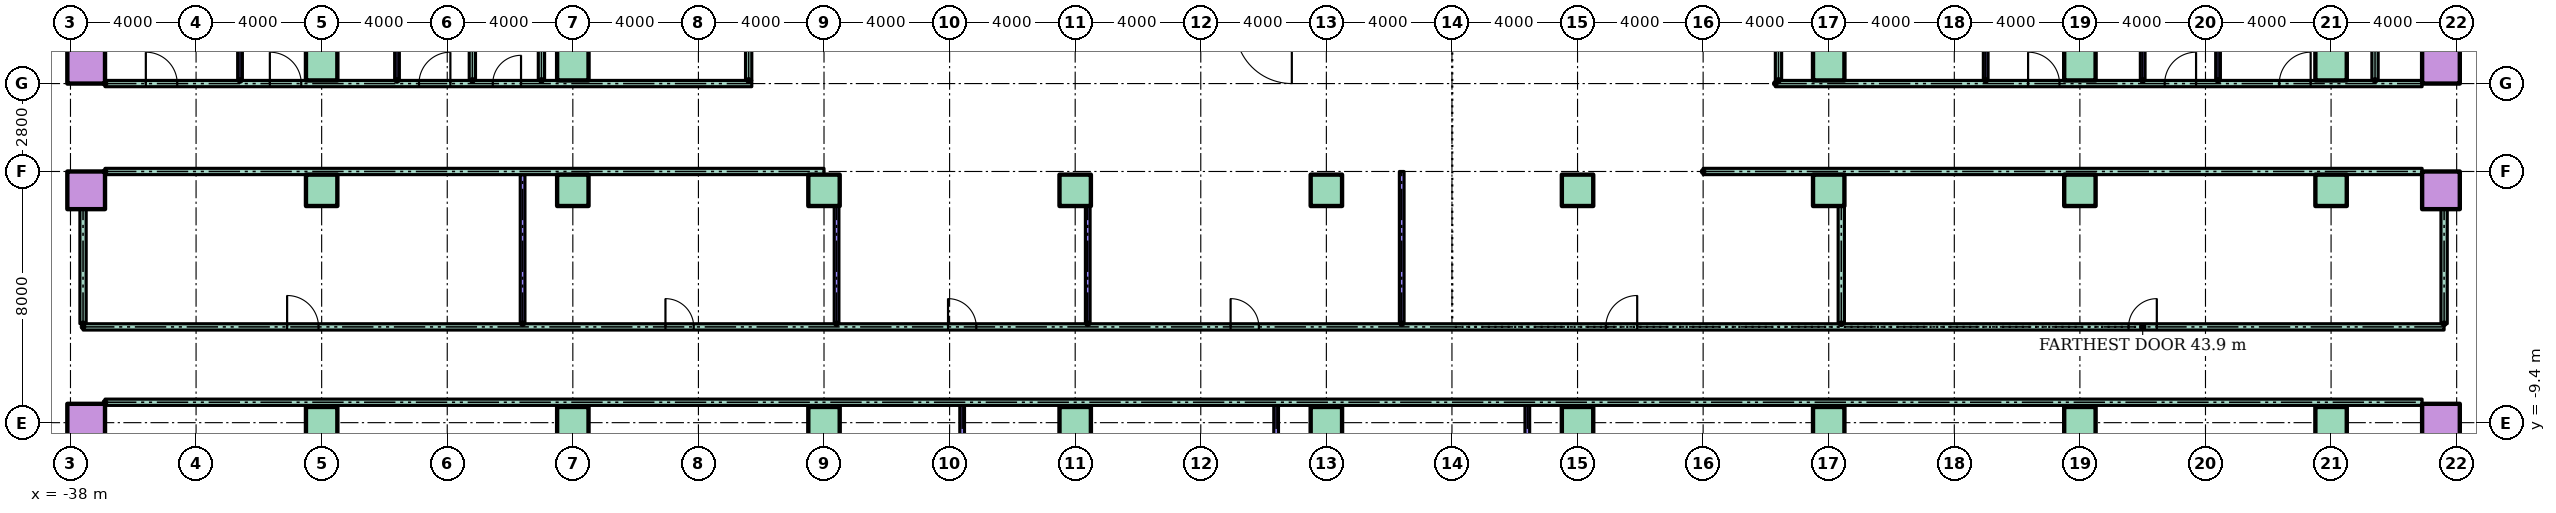
"""IFC4 building model, lengths in metres.
Left out: names, types, materials, properties, quantities, classifications, styles, units other than length and angle.
Written with IfcOpenShell. Run it as: python <this file> out.ifc"""

import sys

from ifc_helpers import new_model, si_unit, direction, frame, frame_2d, origin, origin_2d, place, context, subcontext, project, spatial, rectangle, hollow_rectangle, extrude, element, fill, save


model = new_model("IFC4")
c1 = context("Model", 3, precision=1e-05, world=origin(), true_north=direction((0.0, 1.0)))
c2 = subcontext(c1, "Body", "Model", "MODEL_VIEW")
j1 = project(units=[si_unit("LENGTHUNIT", "METRE"), si_unit("PLANEANGLEUNIT", "RADIAN")], contexts=[c1])
p1 = place(None, origin())
s1 = spatial("IfcSite", under=j1, at=p1, CompositionType="ELEMENT")
p2 = place(p1, origin())
s2 = spatial("IfcBuilding", under=s1, at=p2, CompositionType="ELEMENT")
p3 = place(p2, frame((0.0, 0.0, 10.0)))
s3 = spatial("IfcBuildingStorey", under=s2, at=p3, CompositionType="ELEMENT", Elevation=10.0)
p4 = place(p3, frame((-37.5, -9.4, 0.0)))
e1 = element("IfcColumn", 1, at=p4, inside=s3, PredefinedType="COLUMN", context=c2, shape_type="SweptSolid", body=[
    extrude(hollow_rectangle(XDim=1.2, YDim=1.2, WallThickness=0.06, at=origin_2d()), origin(), (0.0, 0.0, 1.0), 4.0),
])
for number, where in (
    (2, (-30.0, -9.4, 0.0)),
    (3, (-22.0, -9.4, 0.0)),
    (4, (-14.0, -9.4, 0.0)),
    (5, (-6.0, -9.4, 0.0)),
    (6, (2.0, -9.4, 0.0)),
    (7, (10.0, -9.4, 0.0)),
    (8, (18.0, -9.4, 0.0)),
    (9, (26.0, -9.4, 0.0)),
    (10, (34.0, -9.4, 0.0)),
):
    element("IfcColumn", number, at=place(p3, frame(where)), inside=s3, PredefinedType="COLUMN", context=c2, shape_type="SweptSolid", body=[
        extrude(rectangle(XDim=1.0, YDim=1.0, at=origin_2d()), origin(), (0.0, 0.0, 1.0), 4.0),
    ])
for number, where in (
    (11, (37.5, -9.4, 0.0)),
    (12, (-37.5, -2.0, 0.0)),
):
    element("IfcColumn", number, at=place(p3, frame(where)), inside=s3, PredefinedType="COLUMN", context=c2, shape_type="SweptSolid", body=[
        extrude(hollow_rectangle(XDim=1.2, YDim=1.2, WallThickness=0.06, at=origin_2d()), origin(), (0.0, 0.0, 1.0), 4.0),
    ])
for number, where in (
    (13, (-30.0, -2.0, 0.0)),
    (14, (-22.0, -2.0, 0.0)),
    (15, (-14.0, -2.0, 0.0)),
    (16, (-6.0, -2.0, 0.0)),
    (17, (2.0, -2.0, 0.0)),
    (18, (10.0, -2.0, 0.0)),
    (19, (18.0, -2.0, 0.0)),
    (20, (26.0, -2.0, 0.0)),
    (21, (34.0, -2.0, 0.0)),
):
    element("IfcColumn", number, at=place(p3, frame(where)), inside=s3, PredefinedType="COLUMN", context=c2, shape_type="SweptSolid", body=[
        extrude(rectangle(XDim=1.0, YDim=1.0, at=origin_2d()), origin(), (0.0, 0.0, 1.0), 4.0),
    ])
for number, where in (
    (22, (37.5, -2.0, 0.0)),
    (23, (-37.5, 2.0, 0.0)),
):
    element("IfcColumn", number, at=place(p3, frame(where)), inside=s3, PredefinedType="COLUMN", context=c2, shape_type="SweptSolid", body=[
        extrude(hollow_rectangle(XDim=1.2, YDim=1.2, WallThickness=0.06, at=origin_2d()), origin(), (0.0, 0.0, 1.0), 4.0),
    ])
for number, where in (
    (24, (-30.0, 2.0, 0.0)),
    (25, (-22.0, 2.0, 0.0)),
    (26, (18.0, 2.0, 0.0)),
    (27, (26.0, 2.0, 0.0)),
    (28, (34.0, 2.0, 0.0)),
):
    element("IfcColumn", number, at=place(p3, frame(where)), inside=s3, PredefinedType="COLUMN", context=c2, shape_type="SweptSolid", body=[
        extrude(rectangle(XDim=1.0, YDim=1.0, at=origin_2d()), origin(), (0.0, 0.0, 1.0), 4.0),
    ])
p5 = place(p3, frame((37.5, 2.0, 0.0)))
e29 = element("IfcColumn", 29, at=p5, inside=s3, PredefinedType="COLUMN", context=c2, shape_type="SweptSolid", body=[
    extrude(hollow_rectangle(XDim=1.2, YDim=1.2, WallThickness=0.06, at=origin_2d()), origin(), (0.0, 0.0, 1.0), 4.0),
])
p6 = place(p3, frame((-36.9, -8.75, 0.0)))
e30 = element("IfcWall", 30, at=p6, inside=s3, PredefinedType="PARTITIONING", context=c2, shape_type="SweptSolid", body=[
    extrude(rectangle(XDim=73.8, YDim=0.2, at=frame_2d((36.9, 0.0))), origin(), (0.0, 0.0, 1.0), 3.7),
])
p7 = place(p3, frame((-37.6, -6.35, 0.0)))
e31 = element("IfcWall", 31, at=p7, inside=s3, PredefinedType="PARTITIONING", context=c2, shape_type="SweptSolid", body=[
    extrude(rectangle(XDim=75.2, YDim=0.2, at=frame_2d((37.6, 0.0))), origin(), (0.0, 0.0, 1.0), 3.7),
])
p8 = place(p7, frame((6.5, 0.0, 0.0)))
e32 = element("IfcOpeningElement", 32, at=p8, cuts=e31, PredefinedType="OPENING", context=c2, shape_type="SweptSolid", body=[
    extrude(rectangle(XDim=1.0, YDim=2.1, at=frame_2d((0.5, 1.05))), frame((0.0, 0.11, 0.0), z_axis=(0.0, -1.0, 0.0), x_axis=(1.0, 0.0, 0.0)), (0.0, 0.0, 1.0), 0.22),
])
p9 = place(p7, frame((18.55, 0.0, 0.0)))
e33 = element("IfcOpeningElement", 33, at=p9, cuts=e31, PredefinedType="OPENING", context=c2, shape_type="SweptSolid", body=[
    extrude(rectangle(XDim=0.9, YDim=2.1, at=frame_2d((0.45, 1.05))), frame((0.0, 0.11, 0.0), z_axis=(0.0, -1.0, 0.0), x_axis=(1.0, 0.0, 0.0)), (0.0, 0.0, 1.0), 0.22),
])
p10 = place(p7, frame((27.55, 0.0, 0.0)))
e34 = element("IfcOpeningElement", 34, at=p10, cuts=e31, PredefinedType="OPENING", context=c2, shape_type="SweptSolid", body=[
    extrude(rectangle(XDim=0.9, YDim=2.1, at=frame_2d((0.45, 1.05))), frame((0.0, 0.11, 0.0), z_axis=(0.0, -1.0, 0.0), x_axis=(1.0, 0.0, 0.0)), (0.0, 0.0, 1.0), 0.22),
])
p11 = place(p7, frame((36.55, 0.0, 0.0)))
e35 = element("IfcOpeningElement", 35, at=p11, cuts=e31, PredefinedType="OPENING", context=c2, shape_type="SweptSolid", body=[
    extrude(rectangle(XDim=0.9, YDim=2.1, at=frame_2d((0.45, 1.05))), frame((0.0, 0.11, 0.0), z_axis=(0.0, -1.0, 0.0), x_axis=(1.0, 0.0, 0.0)), (0.0, 0.0, 1.0), 0.22),
])
p12 = place(p7, frame((48.5, 0.0, 0.0)))
e36 = element("IfcOpeningElement", 36, at=p12, cuts=e31, PredefinedType="OPENING", context=c2, shape_type="SweptSolid", body=[
    extrude(rectangle(XDim=1.0, YDim=2.1, at=frame_2d((0.5, 1.05))), frame((0.0, 0.11, 0.0), z_axis=(0.0, -1.0, 0.0), x_axis=(1.0, 0.0, 0.0)), (0.0, 0.0, 1.0), 0.22),
])
p13 = place(p7, frame((65.15, 0.0, 0.0)))
e37 = element("IfcOpeningElement", 37, at=p13, cuts=e31, PredefinedType="OPENING", context=c2, shape_type="SweptSolid", body=[
    extrude(rectangle(XDim=0.9, YDim=2.1, at=frame_2d((0.45, 1.05))), frame((0.0, 0.11, 0.0), z_axis=(0.0, -1.0, 0.0), x_axis=(1.0, 0.0, 0.0)), (0.0, 0.0, 1.0), 0.22),
])
for number, where in (
    (38, (-36.9, -1.4, 0.0)),
    (39, (14.0, -1.4, 0.0)),
):
    element("IfcWall", number, at=place(p3, frame(where)), inside=s3, PredefinedType="PARTITIONING", context=c2, shape_type="SweptSolid", body=[
        extrude(rectangle(XDim=22.9, YDim=0.2, at=frame_2d((11.45, 0.0))), origin(), (0.0, 0.0, 1.0), 3.7),
    ])
p14 = place(p3, frame((-36.9, 1.4, 0.0)))
e40 = element("IfcWall", 40, at=p14, inside=s3, PredefinedType="PARTITIONING", context=c2, shape_type="SweptSolid", body=[
    extrude(rectangle(XDim=20.6, YDim=0.2, at=frame_2d((10.3, 0.0))), origin(), (0.0, 0.0, 1.0), 3.7),
])
p15 = place(p14, frame((1.3, 0.0, 0.0)))
e41 = element("IfcOpeningElement", 41, at=p15, cuts=e40, PredefinedType="OPENING", context=c2, shape_type="SweptSolid", body=[
    extrude(rectangle(XDim=1.0, YDim=2.1, at=frame_2d((0.5, 1.05))), frame((0.0, 0.11, 0.0), z_axis=(0.0, -1.0, 0.0), x_axis=(1.0, 0.0, 0.0)), (0.0, 0.0, 1.0), 0.22),
])
p16 = place(p14, frame((5.25, 0.0, 0.0)))
e42 = element("IfcOpeningElement", 42, at=p16, cuts=e40, PredefinedType="OPENING", context=c2, shape_type="SweptSolid", body=[
    extrude(rectangle(XDim=1.0, YDim=2.1, at=frame_2d((0.5, 1.05))), frame((0.0, 0.11, 0.0), z_axis=(0.0, -1.0, 0.0), x_axis=(1.0, 0.0, 0.0)), (0.0, 0.0, 1.0), 0.22),
])
p17 = place(p14, frame((10.0, 0.0, 0.0)))
e43 = element("IfcOpeningElement", 43, at=p17, cuts=e40, PredefinedType="OPENING", context=c2, shape_type="SweptSolid", body=[
    extrude(rectangle(XDim=1.0, YDim=2.1, at=frame_2d((0.5, 1.05))), frame((0.0, 0.11, 0.0), z_axis=(0.0, -1.0, 0.0), x_axis=(1.0, 0.0, 0.0)), (0.0, 0.0, 1.0), 0.22),
])
p18 = place(p14, frame((12.35, 0.0, 0.0)))
e44 = element("IfcOpeningElement", 44, at=p18, cuts=e40, PredefinedType="OPENING", context=c2, shape_type="SweptSolid", body=[
    extrude(rectangle(XDim=0.9, YDim=2.1, at=frame_2d((0.45, 1.05))), frame((0.0, 0.11, 0.0), z_axis=(0.0, -1.0, 0.0), x_axis=(1.0, 0.0, 0.0)), (0.0, 0.0, 1.0), 0.22),
])
p19 = place(p3, frame((16.3, 1.4, 0.0)))
e45 = element("IfcWall", 45, at=p19, inside=s3, PredefinedType="PARTITIONING", context=c2, shape_type="SweptSolid", body=[
    extrude(rectangle(XDim=20.6, YDim=0.2, at=frame_2d((10.3, 0.0))), origin(), (0.0, 0.0, 1.0), 3.7),
])
p20 = place(p19, frame((8.05, 0.0, 0.0)))
e46 = element("IfcOpeningElement", 46, at=p20, cuts=e45, PredefinedType="OPENING", context=c2, shape_type="SweptSolid", body=[
    extrude(rectangle(XDim=1.0, YDim=2.1, at=frame_2d((0.5, 1.05))), frame((0.0, 0.11, 0.0), z_axis=(0.0, -1.0, 0.0), x_axis=(1.0, 0.0, 0.0)), (0.0, 0.0, 1.0), 0.22),
])
p21 = place(p19, frame((12.4, 0.0, 0.0)))
e47 = element("IfcOpeningElement", 47, at=p21, cuts=e45, PredefinedType="OPENING", context=c2, shape_type="SweptSolid", body=[
    extrude(rectangle(XDim=1.0, YDim=2.1, at=frame_2d((0.5, 1.05))), frame((0.0, 0.11, 0.0), z_axis=(0.0, -1.0, 0.0), x_axis=(1.0, 0.0, 0.0)), (0.0, 0.0, 1.0), 0.22),
])
p22 = place(p19, frame((16.05, 0.0, 0.0)))
e48 = element("IfcOpeningElement", 48, at=p22, cuts=e45, PredefinedType="OPENING", context=c2, shape_type="SweptSolid", body=[
    extrude(rectangle(XDim=1.0, YDim=2.1, at=frame_2d((0.5, 1.05))), frame((0.0, 0.11, 0.0), z_axis=(0.0, -1.0, 0.0), x_axis=(1.0, 0.0, 0.0)), (0.0, 0.0, 1.0), 0.22),
])
p23 = place(p3, frame((-37.6, -6.25, 0.0), z_axis=(0.0, 0.0, 1.0), x_axis=(0.0, 1.0, 0.0)))
e49 = element("IfcWall", 49, at=p23, inside=s3, PredefinedType="PARTITIONING", context=c2, shape_type="SweptSolid", body=[
    extrude(rectangle(XDim=3.65, YDim=0.2, at=frame_2d((1.825, 0.0))), origin(), (0.0, 0.0, 1.0), 3.7),
])
for number, where, z_axis, x_axis in (
    (50, (-32.6, 1.5, 0.0), (0.0, 0.0, 1.0), (0.0, 1.0, 0.0)),
    (51, (-27.6, 1.5, 0.0), (0.0, 0.0, 1.0), (0.0, 1.0, 0.0)),
):
    element("IfcWall", number, at=place(p3, frame(where, z_axis=z_axis, x_axis=x_axis)), inside=s3, PredefinedType="PARTITIONING", context=c2, shape_type="SweptSolid", body=[
        extrude(rectangle(XDim=7.0, YDim=0.15, at=frame_2d((3.5, 0.0))), origin(), (0.0, 0.0, 1.0), 3.7),
    ])
p24 = place(p3, frame((-25.2, 1.5, 0.0), z_axis=(0.0, 0.0, 1.0), x_axis=(0.0, 1.0, 0.0)))
e52 = element("IfcWall", 52, at=p24, inside=s3, PredefinedType="PARTITIONING", context=c2, shape_type="SweptSolid", body=[
    extrude(rectangle(XDim=7.0, YDim=0.2, at=frame_2d((3.5, 0.0))), origin(), (0.0, 0.0, 1.0), 3.7),
])
p25 = place(p3, frame((-23.6, -6.25, 0.0), z_axis=(0.0, 0.0, 1.0), x_axis=(0.0, 1.0, 0.0)))
e53 = element("IfcWall", 53, at=p25, inside=s3, PredefinedType="PARTITIONING", context=c2, shape_type="SweptSolid", body=[
    extrude(rectangle(XDim=4.75, YDim=0.15, at=frame_2d((2.375, 0.0))), origin(), (0.0, 0.0, 1.0), 3.7),
])
p26 = place(p3, frame((-23.0, 1.5, 0.0), z_axis=(0.0, 0.0, 1.0), x_axis=(0.0, 1.0, 0.0)))
e54 = element("IfcWall", 54, at=p26, inside=s3, PredefinedType="PARTITIONING", context=c2, shape_type="SweptSolid", body=[
    extrude(rectangle(XDim=7.0, YDim=0.2, at=frame_2d((3.5, 0.0))), origin(), (0.0, 0.0, 1.0), 3.7),
])
p27 = place(p3, frame((-16.4, 1.5, 0.0), z_axis=(0.0, 0.0, 1.0), x_axis=(0.0, 1.0, 0.0)))
e55 = element("IfcWall", 55, at=p27, inside=s3, PredefinedType="PARTITIONING", context=c2, shape_type="SweptSolid", body=[
    extrude(rectangle(XDim=7.0, YDim=0.2, at=frame_2d((3.5, 0.0))), origin(), (0.0, 0.0, 1.0), 3.7),
])
p28 = place(p27, frame((3.05, 0.0, 0.0)))
e56 = element("IfcOpeningElement", 56, at=p28, cuts=e55, PredefinedType="OPENING", context=c2, shape_type="SweptSolid", body=[
    extrude(rectangle(XDim=0.9, YDim=2.1, at=frame_2d((0.45, 1.05))), frame((0.0, 0.11, 0.0), z_axis=(0.0, -1.0, 0.0), x_axis=(1.0, 0.0, 0.0)), (0.0, 0.0, 1.0), 0.22),
])
p29 = place(p3, frame((-13.6, -6.25, 0.0), z_axis=(0.0, 0.0, 1.0), x_axis=(0.0, 1.0, 0.0)))
e57 = element("IfcWall", 57, at=p29, inside=s3, PredefinedType="PARTITIONING", context=c2, shape_type="SweptSolid", body=[
    extrude(rectangle(XDim=3.75, YDim=0.15, at=frame_2d((1.875, 0.0))), origin(), (0.0, 0.0, 1.0), 3.7),
])
p30 = place(p3, frame((-9.6, -19.5, 0.0), z_axis=(0.0, 0.0, 1.0), x_axis=(0.0, 1.0, 0.0)))
e58 = element("IfcWall", 58, at=p30, inside=s3, PredefinedType="PARTITIONING", context=c2, shape_type="SweptSolid", body=[
    extrude(rectangle(XDim=10.65, YDim=0.15, at=frame_2d((5.325, 0.0))), origin(), (0.0, 0.0, 1.0), 3.7),
])
p31 = place(p3, frame((-5.6, -6.25, 0.0), z_axis=(0.0, 0.0, 1.0), x_axis=(0.0, 1.0, 0.0)))
e59 = element("IfcWall", 59, at=p31, inside=s3, PredefinedType="PARTITIONING", context=c2, shape_type="SweptSolid", body=[
    extrude(rectangle(XDim=3.75, YDim=0.15, at=frame_2d((1.875, 0.0))), origin(), (0.0, 0.0, 1.0), 3.7),
])
p32 = place(p3, frame((0.4, -19.5, 0.0), z_axis=(0.0, 0.0, 1.0), x_axis=(0.0, 1.0, 0.0)))
e60 = element("IfcWall", 60, at=p32, inside=s3, PredefinedType="PARTITIONING", context=c2, shape_type="SweptSolid", body=[
    extrude(rectangle(XDim=10.65, YDim=0.15, at=frame_2d((5.325, 0.0))), origin(), (0.0, 0.0, 1.0), 3.7),
])
p33 = place(p3, frame((4.4, -6.25, 0.0), z_axis=(0.0, 0.0, 1.0), x_axis=(0.0, 1.0, 0.0)))
e61 = element("IfcWall", 61, at=p33, inside=s3, PredefinedType="PARTITIONING", context=c2, shape_type="SweptSolid", body=[
    extrude(rectangle(XDim=4.85, YDim=0.15, at=frame_2d((2.425, 0.0))), origin(), (0.0, 0.0, 1.0), 3.7),
])
p34 = place(p3, frame((8.4, -19.5, 0.0), z_axis=(0.0, 0.0, 1.0), x_axis=(0.0, 1.0, 0.0)))
e62 = element("IfcWall", 62, at=p34, inside=s3, PredefinedType="PARTITIONING", context=c2, shape_type="SweptSolid", body=[
    extrude(rectangle(XDim=10.65, YDim=0.15, at=frame_2d((5.325, 0.0))), origin(), (0.0, 0.0, 1.0), 3.7),
])
p35 = place(p3, frame((16.4, 1.5, 0.0), z_axis=(0.0, 0.0, 1.0), x_axis=(0.0, 1.0, 0.0)))
e63 = element("IfcWall", 63, at=p35, inside=s3, PredefinedType="PARTITIONING", context=c2, shape_type="SweptSolid", body=[
    extrude(rectangle(XDim=7.0, YDim=0.2, at=frame_2d((3.5, 0.0))), origin(), (0.0, 0.0, 1.0), 3.7),
])
p36 = place(p35, frame((3.0, 0.0, 0.0)))
e64 = element("IfcOpeningElement", 64, at=p36, cuts=e63, PredefinedType="OPENING", context=c2, shape_type="SweptSolid", body=[
    extrude(rectangle(XDim=1.0, YDim=2.1, at=frame_2d((0.5, 1.05))), frame((0.0, 0.11, 0.0), z_axis=(0.0, -1.0, 0.0), x_axis=(1.0, 0.0, 0.0)), (0.0, 0.0, 1.0), 0.22),
])
p37 = place(p3, frame((18.4, -6.25, 0.0), z_axis=(0.0, 0.0, 1.0), x_axis=(0.0, 1.0, 0.0)))
e65 = element("IfcWall", 65, at=p37, inside=s3, PredefinedType="PARTITIONING", context=c2, shape_type="SweptSolid", body=[
    extrude(rectangle(XDim=3.75, YDim=0.2, at=frame_2d((1.875, 0.0))), origin(), (0.0, 0.0, 1.0), 3.7),
])
for number, where, z_axis, x_axis in (
    (66, (23.0, 1.5, 0.0), (0.0, 0.0, 1.0), (0.0, 1.0, 0.0)),
    (67, (28.0, 1.5, 0.0), (0.0, 0.0, 1.0), (0.0, 1.0, 0.0)),
    (68, (30.4, 1.5, 0.0), (0.0, 0.0, 1.0), (0.0, 1.0, 0.0)),
):
    element("IfcWall", number, at=place(p3, frame(where, z_axis=z_axis, x_axis=x_axis)), inside=s3, PredefinedType="PARTITIONING", context=c2, shape_type="SweptSolid", body=[
        extrude(rectangle(XDim=7.0, YDim=0.15, at=frame_2d((3.5, 0.0))), origin(), (0.0, 0.0, 1.0), 3.7),
    ])
p38 = place(p3, frame((35.4, 1.5, 0.0), z_axis=(0.0, 0.0, 1.0), x_axis=(0.0, 1.0, 0.0)))
e69 = element("IfcWall", 69, at=p38, inside=s3, PredefinedType="PARTITIONING", context=c2, shape_type="SweptSolid", body=[
    extrude(rectangle(XDim=7.0, YDim=0.2, at=frame_2d((3.5, 0.0))), origin(), (0.0, 0.0, 1.0), 3.7),
])
p39 = place(p3, frame((37.6, -6.25, 0.0), z_axis=(0.0, 0.0, 1.0), x_axis=(0.0, 1.0, 0.0)))
e70 = element("IfcWall", 70, at=p39, inside=s3, PredefinedType="PARTITIONING", context=c2, shape_type="SweptSolid", body=[
    extrude(rectangle(XDim=3.65, YDim=0.2, at=frame_2d((1.825, 0.0))), origin(), (0.0, 0.0, 1.0), 3.7),
])
p40 = place(p8, origin())
e71 = element("IfcDoor", 71, at=p40, inside=s3, OperationType="SINGLE_SWING_LEFT", PredefinedType="DOOR", context=c2, shape_type="SweptSolid", body=[
    extrude(rectangle(XDim=1.0, YDim=2.1, at=frame_2d((0.5, 1.05))), frame((0.0, 0.025, 0.0), z_axis=(0.0, -1.0, 0.0), x_axis=(1.0, 0.0, 0.0)), (0.0, 0.0, 1.0), 0.05),
])
fill(e32, e71)
p41 = place(p9, origin())
e72 = element("IfcDoor", 72, at=p41, inside=s3, OperationType="SINGLE_SWING_LEFT", PredefinedType="DOOR", context=c2, shape_type="SweptSolid", body=[
    extrude(rectangle(XDim=0.9, YDim=2.1, at=frame_2d((0.45, 1.05))), frame((0.0, 0.025, 0.0), z_axis=(0.0, -1.0, 0.0), x_axis=(1.0, 0.0, 0.0)), (0.0, 0.0, 1.0), 0.05),
])
fill(e33, e72)
p42 = place(p10, origin())
e73 = element("IfcDoor", 73, at=p42, inside=s3, OperationType="SINGLE_SWING_LEFT", PredefinedType="DOOR", context=c2, shape_type="SweptSolid", body=[
    extrude(rectangle(XDim=0.9, YDim=2.1, at=frame_2d((0.45, 1.05))), frame((0.0, 0.025, 0.0), z_axis=(0.0, -1.0, 0.0), x_axis=(1.0, 0.0, 0.0)), (0.0, 0.0, 1.0), 0.05),
])
fill(e34, e73)
p43 = place(p11, origin())
e74 = element("IfcDoor", 74, at=p43, inside=s3, OperationType="SINGLE_SWING_LEFT", PredefinedType="DOOR", context=c2, shape_type="SweptSolid", body=[
    extrude(rectangle(XDim=0.9, YDim=2.1, at=frame_2d((0.45, 1.05))), frame((0.0, 0.025, 0.0), z_axis=(0.0, -1.0, 0.0), x_axis=(1.0, 0.0, 0.0)), (0.0, 0.0, 1.0), 0.05),
])
fill(e35, e74)
p44 = place(p12, origin())
e75 = element("IfcDoor", 75, at=p44, inside=s3, OperationType="SINGLE_SWING_RIGHT", PredefinedType="DOOR", context=c2, shape_type="SweptSolid", body=[
    extrude(rectangle(XDim=1.0, YDim=2.1, at=frame_2d((0.5, 1.05))), frame((0.0, 0.025, 0.0), z_axis=(0.0, -1.0, 0.0), x_axis=(1.0, 0.0, 0.0)), (0.0, 0.0, 1.0), 0.05),
])
fill(e36, e75)
p45 = place(p13, origin())
e76 = element("IfcDoor", 76, at=p45, inside=s3, OperationType="SINGLE_SWING_RIGHT", PredefinedType="DOOR", context=c2, shape_type="SweptSolid", body=[
    extrude(rectangle(XDim=0.9, YDim=2.1, at=frame_2d((0.45, 1.05))), frame((0.0, 0.025, 0.0), z_axis=(0.0, -1.0, 0.0), x_axis=(1.0, 0.0, 0.0)), (0.0, 0.0, 1.0), 0.05),
])
fill(e37, e76)
p46 = place(p15, origin())
e77 = element("IfcDoor", 77, at=p46, inside=s3, OperationType="SINGLE_SWING_LEFT", PredefinedType="DOOR", context=c2, shape_type="SweptSolid", body=[
    extrude(rectangle(XDim=1.0, YDim=2.1, at=frame_2d((0.5, 1.05))), frame((0.0, 0.025, 0.0), z_axis=(0.0, -1.0, 0.0), x_axis=(1.0, 0.0, 0.0)), (0.0, 0.0, 1.0), 0.05),
])
fill(e41, e77)
p47 = place(p16, origin())
e78 = element("IfcDoor", 78, at=p47, inside=s3, OperationType="SINGLE_SWING_LEFT", PredefinedType="DOOR", context=c2, shape_type="SweptSolid", body=[
    extrude(rectangle(XDim=1.0, YDim=2.1, at=frame_2d((0.5, 1.05))), frame((0.0, 0.025, 0.0), z_axis=(0.0, -1.0, 0.0), x_axis=(1.0, 0.0, 0.0)), (0.0, 0.0, 1.0), 0.05),
])
fill(e42, e78)
p48 = place(p17, origin())
e79 = element("IfcDoor", 79, at=p48, inside=s3, OperationType="SINGLE_SWING_RIGHT", PredefinedType="DOOR", context=c2, shape_type="SweptSolid", body=[
    extrude(rectangle(XDim=1.0, YDim=2.1, at=frame_2d((0.5, 1.05))), frame((0.0, 0.025, 0.0), z_axis=(0.0, -1.0, 0.0), x_axis=(1.0, 0.0, 0.0)), (0.0, 0.0, 1.0), 0.05),
])
fill(e43, e79)
p49 = place(p18, origin())
e80 = element("IfcDoor", 80, at=p49, inside=s3, OperationType="SINGLE_SWING_RIGHT", PredefinedType="DOOR", context=c2, shape_type="SweptSolid", body=[
    extrude(rectangle(XDim=0.9, YDim=2.1, at=frame_2d((0.45, 1.05))), frame((0.0, 0.025, 0.0), z_axis=(0.0, -1.0, 0.0), x_axis=(1.0, 0.0, 0.0)), (0.0, 0.0, 1.0), 0.05),
])
fill(e44, e80)
p50 = place(p20, origin())
e81 = element("IfcDoor", 81, at=p50, inside=s3, OperationType="SINGLE_SWING_LEFT", PredefinedType="DOOR", context=c2, shape_type="SweptSolid", body=[
    extrude(rectangle(XDim=1.0, YDim=2.1, at=frame_2d((0.5, 1.05))), frame((0.0, 0.025, 0.0), z_axis=(0.0, -1.0, 0.0), x_axis=(1.0, 0.0, 0.0)), (0.0, 0.0, 1.0), 0.05),
])
fill(e46, e81)
p51 = place(p21, origin())
e82 = element("IfcDoor", 82, at=p51, inside=s3, OperationType="SINGLE_SWING_RIGHT", PredefinedType="DOOR", context=c2, shape_type="SweptSolid", body=[
    extrude(rectangle(XDim=1.0, YDim=2.1, at=frame_2d((0.5, 1.05))), frame((0.0, 0.025, 0.0), z_axis=(0.0, -1.0, 0.0), x_axis=(1.0, 0.0, 0.0)), (0.0, 0.0, 1.0), 0.05),
])
fill(e47, e82)
p52 = place(p22, origin())
e83 = element("IfcDoor", 83, at=p52, inside=s3, OperationType="SINGLE_SWING_RIGHT", PredefinedType="DOOR", context=c2, shape_type="SweptSolid", body=[
    extrude(rectangle(XDim=1.0, YDim=2.1, at=frame_2d((0.5, 1.05))), frame((0.0, 0.025, 0.0), z_axis=(0.0, -1.0, 0.0), x_axis=(1.0, 0.0, 0.0)), (0.0, 0.0, 1.0), 0.05),
])
fill(e48, e83)
save(model, sys.argv[1])
